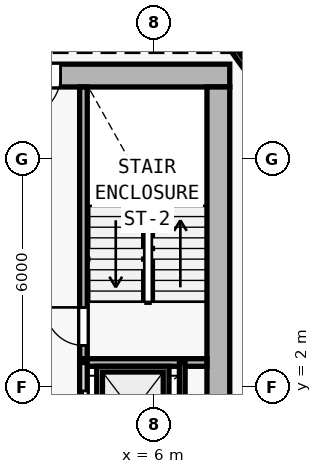
"""IFC4 building model, lengths in metres.
Left out: names, types, materials, properties, quantities, classifications, styles, units other than length and angle.
Written with IfcOpenShell. Run it as: python <this file> out.ifc"""

import sys

from ifc_helpers import new_model, si_unit, direction, frame, frame_2d, origin, origin_2d, place, context, subcontext, project, spatial, rectangle, i_section, extrude, element, fill, save


model = new_model("IFC4")
c1 = context("Model", 3, precision=1e-05, world=origin(), true_north=direction((0.0, 1.0)))
c2 = subcontext(c1, "Body", "Model", "MODEL_VIEW")
j1 = project(units=[si_unit("LENGTHUNIT", "METRE"), si_unit("PLANEANGLEUNIT", "RADIAN")], contexts=[c1])
p1 = place(None, origin())
s1 = spatial("IfcSite", under=j1, at=p1, CompositionType="ELEMENT")
p2 = place(p1, origin())
s2 = spatial("IfcBuilding", under=s1, at=p2, CompositionType="ELEMENT")
p3 = place(p2, frame((0.0, 0.0, 37.2)))
s3 = spatial("IfcBuildingStorey", under=s2, at=p3, CompositionType="ELEMENT", Elevation=37.2)
p4 = place(p3, frame((7.7, 10.2, 0.0), z_axis=(0.0, 0.0, 1.0), x_axis=(1.0, 0.0, 0.0)))
e1 = element("IfcColumn", 1, at=p4, inside=s3, PredefinedType="COLUMN", context=c2, shape_type="SweptSolid", body=[
    extrude(i_section(OverallWidth=0.416, OverallDepth=0.446, WebThickness=0.025, FlangeThickness=0.04, FilletRadius=0.015, at=origin_2d()), origin(), (0.0, 0.0, 1.0), 3.6),
])
p5 = place(p3, frame((8.0, 10.2, 0.0), z_axis=(0.0, 0.0, 1.0), x_axis=(-1.0, 0.0, 0.0)))
e2 = element("IfcWall", 2, at=p5, inside=s3, PredefinedType="SHEAR", context=c2, shape_type="SweptSolid", body=[
    extrude(rectangle(XDim=16.0, YDim=0.6, at=frame_2d((8.0, 0.0))), origin(), (0.0, 0.0, 1.0), 3.35),
])
p6 = place(p5, frame((4.45, 0.0, 0.0)))
e3 = element("IfcOpeningElement", 3, at=p6, cuts=e2, PredefinedType="OPENING", context=c2, shape_type="SweptSolid", body=[
    extrude(rectangle(XDim=1.1, YDim=2.15, at=frame_2d((0.55, 1.075))), frame((0.0, 0.31, 0.0), z_axis=(0.0, -1.0, 0.0), x_axis=(1.0, 0.0, 0.0)), (0.0, 0.0, 1.0), 0.62),
])
p7 = place(p3, frame((7.7, 9.9, 0.0), z_axis=(0.0, 0.0, 1.0), x_axis=(0.0, -1.0, 0.0)))
e4 = element("IfcWall", 4, at=p7, inside=s3, PredefinedType="SHEAR", context=c2, shape_type="SweptSolid", body=[
    extrude(rectangle(XDim=19.0, YDim=0.6, at=frame_2d((9.5, 0.0))), origin(), (0.0, 0.0, 1.0), 3.35),
])
p8 = place(p3, frame((4.15, 2.75, 0.0), z_axis=(0.0, 0.0, 1.0), x_axis=(0.0, 1.0, 0.0)))
e5 = element("IfcWall", 5, at=p8, inside=s3, PredefinedType="SOLIDWALL", context=c2, shape_type="SweptSolid", body=[
    extrude(rectangle(XDim=7.15, YDim=0.2, at=frame_2d((3.575, 0.0))), origin(), (0.0, 0.0, 1.0), 3.35),
])
p9 = place(p8, frame((0.35, 0.0, 0.0)))
e6 = element("IfcOpeningElement", 6, at=p9, cuts=e5, PredefinedType="OPENING", context=c2, shape_type="SweptSolid", body=[
    extrude(rectangle(XDim=1.0, YDim=2.15, at=frame_2d((0.5, 1.075))), frame((0.0, 0.11, 0.0), z_axis=(0.0, -1.0, 0.0), x_axis=(1.0, 0.0, 0.0)), (0.0, 0.0, 1.0), 0.22),
])
p10 = place(p3, frame((4.05, 2.65, 0.0), z_axis=(0.0, 0.0, 1.0), x_axis=(1.0, 0.0, 0.0)))
e7 = element("IfcWall", 7, at=p10, inside=s3, PredefinedType="SOLIDWALL", context=c2, shape_type="SweptSolid", body=[
    extrude(rectangle(XDim=3.35, YDim=0.2, at=frame_2d((1.675, 0.0))), origin(), (0.0, 0.0, 1.0), 3.35),
])
p11 = place(p3, frame((4.15, -6.05, 0.0), z_axis=(0.0, 0.0, 1.0), x_axis=(0.0, 1.0, 0.0)))
e8 = element("IfcWall", 8, at=p11, inside=s3, PredefinedType="SOLIDWALL", context=c2, shape_type="SweptSolid", body=[
    extrude(rectangle(XDim=8.7, YDim=0.2, at=frame_2d((4.35, 0.0))), origin(), (0.0, 0.0, 1.0), 3.35),
])
p12 = place(p11, frame((0.55, 0.0, 0.0)))
e9 = element("IfcOpeningElement", 9, at=p12, cuts=e8, PredefinedType="OPENING", context=c2, shape_type="SweptSolid", body=[
    extrude(rectangle(XDim=1.1, YDim=2.15, at=frame_2d((0.55, 1.075))), frame((0.0, 0.11, 0.0), z_axis=(0.0, -1.0, 0.0), x_axis=(1.0, 0.0, 0.0)), (0.0, 0.0, 1.0), 0.22),
])
p13 = place(p11, frame((2.65, 0.0, 0.0)))
e10 = element("IfcOpeningElement", 10, at=p13, cuts=e8, PredefinedType="OPENING", context=c2, shape_type="SweptSolid", body=[
    extrude(rectangle(XDim=1.1, YDim=2.15, at=frame_2d((0.55, 1.075))), frame((0.0, 0.11, 0.0), z_axis=(0.0, -1.0, 0.0), x_axis=(1.0, 0.0, 0.0)), (0.0, 0.0, 1.0), 0.22),
])
p14 = place(p11, frame((4.75, 0.0, 0.0)))
e11 = element("IfcOpeningElement", 11, at=p14, cuts=e8, PredefinedType="OPENING", context=c2, shape_type="SweptSolid", body=[
    extrude(rectangle(XDim=1.1, YDim=2.15, at=frame_2d((0.55, 1.075))), frame((0.0, 0.11, 0.0), z_axis=(0.0, -1.0, 0.0), x_axis=(1.0, 0.0, 0.0)), (0.0, 0.0, 1.0), 0.22),
])
p15 = place(p11, frame((6.85, 0.0, 0.0)))
e12 = element("IfcOpeningElement", 12, at=p15, cuts=e8, PredefinedType="OPENING", context=c2, shape_type="SweptSolid", body=[
    extrude(rectangle(XDim=1.1, YDim=2.15, at=frame_2d((0.55, 1.075))), frame((0.0, 0.11, 0.0), z_axis=(0.0, -1.0, 0.0), x_axis=(1.0, 0.0, 0.0)), (0.0, 0.0, 1.0), 0.22),
])
p16 = place(p3, frame((6.75, -6.05, 0.0), z_axis=(0.0, 0.0, 1.0), x_axis=(0.0, 1.0, 0.0)))
e13 = element("IfcWall", 13, at=p16, inside=s3, PredefinedType="PARTITIONING", context=c2, shape_type="SweptSolid", body=[
    extrude(rectangle(XDim=8.7, YDim=0.15, at=frame_2d((4.35, 0.0))), origin(), (0.0, 0.0, 1.0), 3.35),
])
p17 = place(p3, frame((7.041, 12.36, 0.0), z_axis=(0.0, 0.0, 1.0), x_axis=(0.582449511476, -0.812866881218, 0.0)))
e14 = element("IfcWall", 14, at=p17, inside=s3, PredefinedType="PARTITIONING", context=c2, shape_type="SweptSolid", body=[
    extrude(rectangle(XDim=4.84, YDim=0.15, at=frame_2d((2.42, 0.0))), origin(), (0.0, 0.0, 1.0), 2.725),
])
p18 = place(p6, origin())
e15 = element("IfcDoor", 15, at=p18, inside=s3, OperationType="SINGLE_SWING_RIGHT", PredefinedType="DOOR", context=c2, shape_type="SweptSolid", body=[
    extrude(rectangle(XDim=1.1, YDim=2.15, at=frame_2d((0.55, 1.075))), frame((0.0, 0.025, 0.0), z_axis=(0.0, -1.0, 0.0), x_axis=(1.0, 0.0, 0.0)), (0.0, 0.0, 1.0), 0.05),
])
fill(e3, e15)
p19 = place(p9, origin())
e16 = element("IfcDoor", 16, at=p19, inside=s3, OperationType="SINGLE_SWING_RIGHT", PredefinedType="DOOR", context=c2, shape_type="SweptSolid", body=[
    extrude(rectangle(XDim=1.0, YDim=2.15, at=frame_2d((0.5, 1.075))), frame((0.0, 0.025, 0.0), z_axis=(0.0, -1.0, 0.0), x_axis=(1.0, 0.0, 0.0)), (0.0, 0.0, 1.0), 0.05),
])
fill(e6, e16)
p20 = place(p15, origin())
e17 = element("IfcDoor", 17, at=p20, inside=s3, OperationType="DOUBLE_DOOR_SLIDING", PredefinedType="DOOR", context=c2, shape_type="SweptSolid", body=[
    extrude(rectangle(XDim=1.1, YDim=2.15, at=frame_2d((0.55, 1.075))), frame((0.0, 0.025, 0.0), z_axis=(0.0, -1.0, 0.0), x_axis=(1.0, 0.0, 0.0)), (0.0, 0.0, 1.0), 0.05),
])
fill(e12, e17)
save(model, sys.argv[1])
